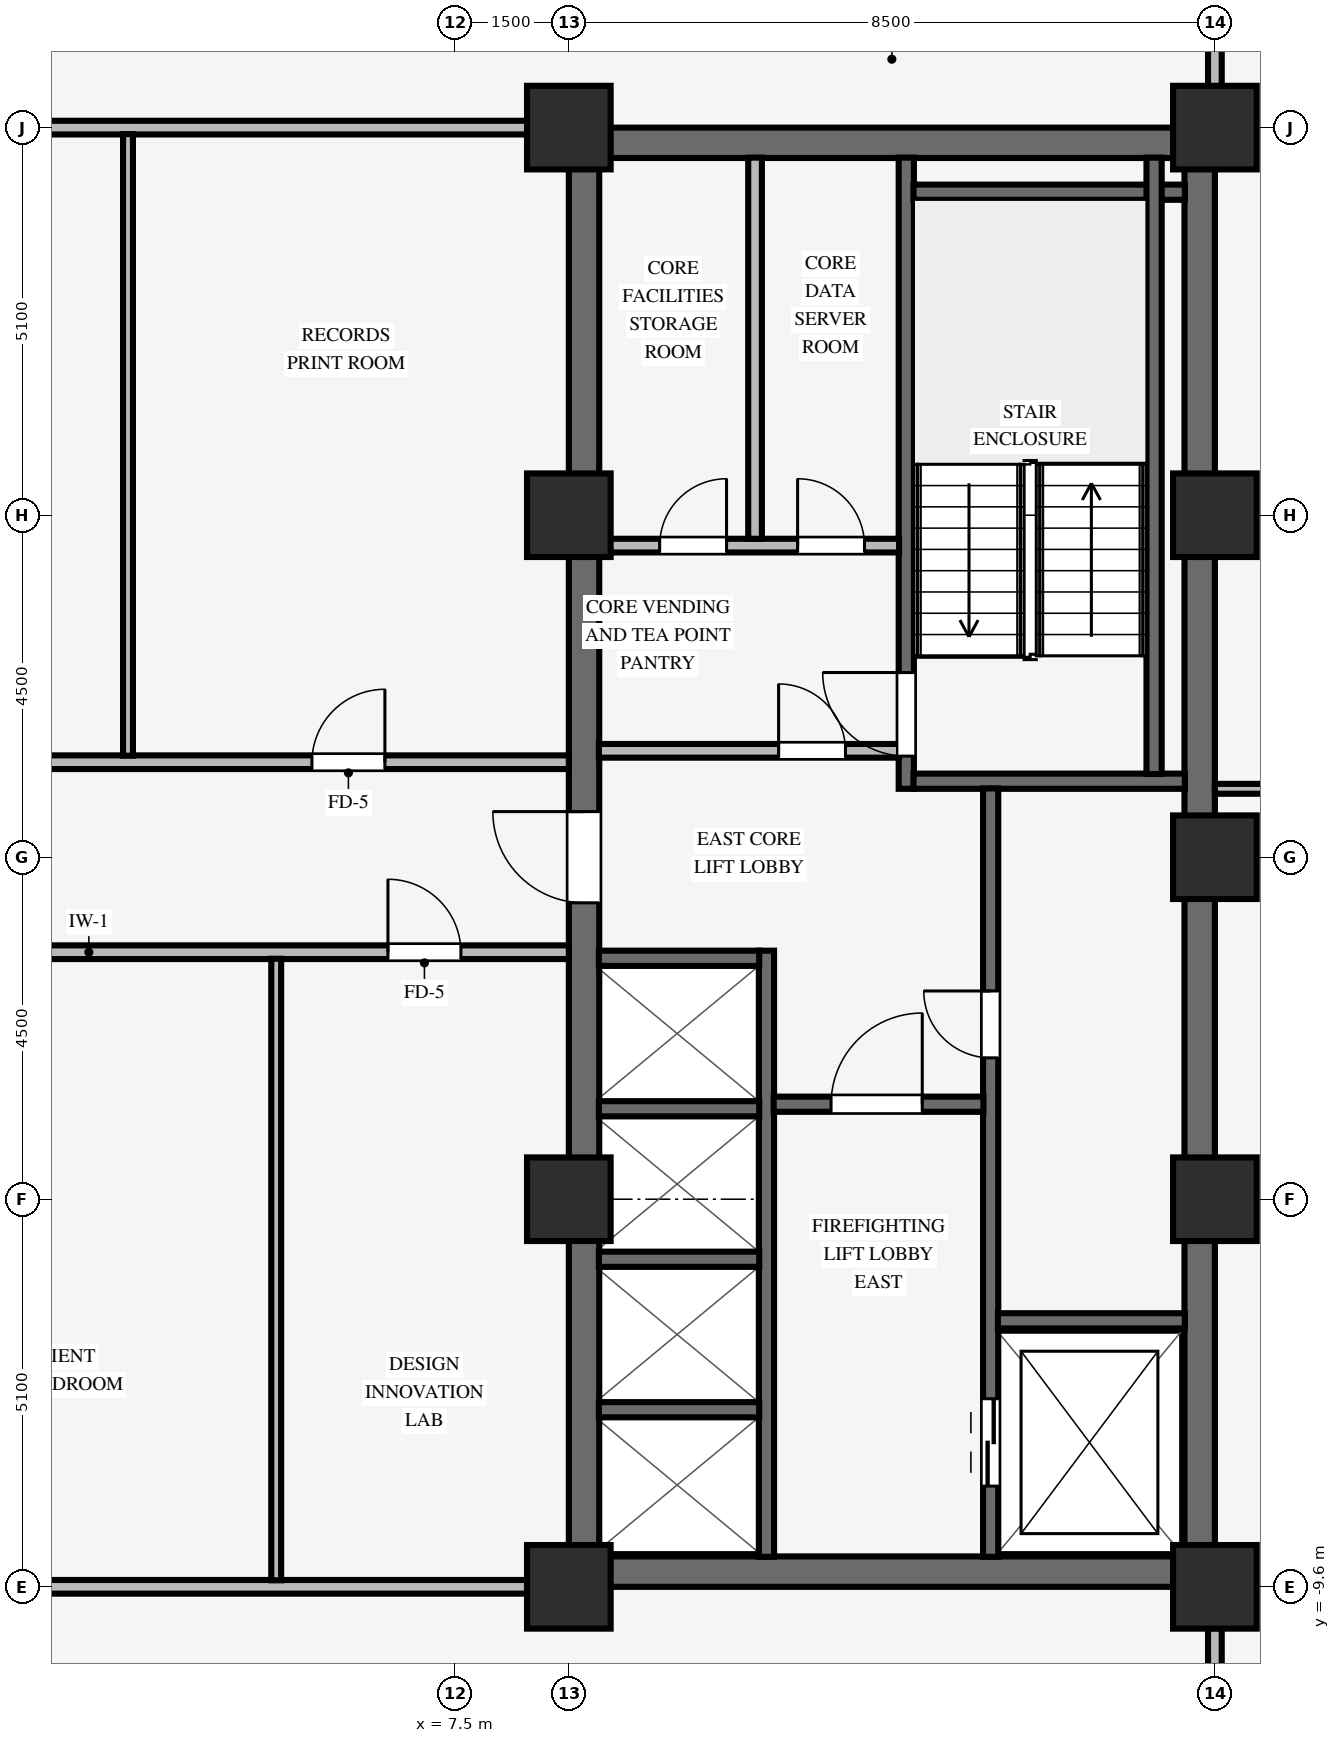
"""IFC4 building model, lengths in metres.
Left out: names, types, materials, properties, quantities, classifications, styles, units other than length and angle.
Written with IfcOpenShell. Run it as: python <this file> out.ifc"""

import sys

from ifc_helpers import new_model, si_unit, direction, frame, frame_2d, origin, origin_2d, place, context, subcontext, project, spatial, rectangle, extrude, source, transform, mapped, element, fill, save


model = new_model("IFC4")
c1 = context("Model", 3, precision=1e-05, world=origin(), true_north=direction((0.0, 1.0)))
c2 = subcontext(c1, "Body", "Model", "MODEL_VIEW")
j1 = project(units=[si_unit("LENGTHUNIT", "METRE"), si_unit("PLANEANGLEUNIT", "RADIAN")], contexts=[c1])
p1 = place(None, origin())
s1 = spatial("IfcSite", under=j1, at=p1, CompositionType="ELEMENT")
p2 = place(p1, origin())
s2 = spatial("IfcBuilding", under=s1, at=p2, CompositionType="ELEMENT")
p3 = place(p2, frame((0.0, 0.0, 109.25)))
s3 = spatial("IfcBuildingStorey", under=s2, at=p3, CompositionType="ELEMENT", Elevation=109.25)
for number, where, z_axis, x_axis in (
    (1, (9.0, -9.4, 0.0), (0.0, 0.0, 1.0), (1.0, 0.0, 0.0)),
    (2, (9.0, 9.4, 0.0), (0.0, 0.0, 1.0), (1.0, 0.0, 0.0)),
):
    element("IfcWall", number, at=place(p3, frame(where, z_axis=z_axis, x_axis=x_axis)), inside=s3, PredefinedType="SHEAR", context=c2, shape_type="SweptSolid", body=[
        extrude(rectangle(XDim=8.5, YDim=0.4, at=frame_2d((4.25, 0.0))), origin(), (0.0, 0.0, 1.0), 3.37),
    ])
p4 = place(p3, frame((9.2, -9.205, 0.0), z_axis=(0.0, 0.0, 1.0), x_axis=(0.0, 1.0, 0.0)))
e3 = element("IfcWall", 3, at=p4, inside=s3, PredefinedType="SHEAR", context=c2, shape_type="SweptSolid", body=[
    extrude(rectangle(XDim=18.41, YDim=0.4, at=frame_2d((9.205, 0.0))), origin(), (0.0, 0.0, 1.0), 3.37),
])
p5 = place(p4, frame((8.605, 0.0, 0.0)))
e4 = element("IfcOpeningElement", 4, at=p5, cuts=e3, PredefinedType="OPENING", context=c2, shape_type="SweptSolid", body=[
    extrude(rectangle(XDim=1.2, YDim=2.15, at=frame_2d((0.6, 1.075))), frame((0.0, 0.21, 0.0), z_axis=(0.0, -1.0, 0.0), x_axis=(1.0, 0.0, 0.0)), (0.0, 0.0, 1.0), 0.42),
])
p6 = place(p3, frame((17.3, -9.205, 0.0), z_axis=(0.0, 0.0, 1.0), x_axis=(0.0, 1.0, 0.0)))
e5 = element("IfcWall", 5, at=p6, inside=s3, PredefinedType="SHEAR", context=c2, shape_type="SweptSolid", body=[
    extrude(rectangle(XDim=18.41, YDim=0.4, at=frame_2d((9.205, 0.0))), origin(), (0.0, 0.0, 1.0), 3.37),
])
for number, where, z_axis, x_axis in (
    (6, (9.0, -9.6, 0.0), (0.0, 0.0, 1.0), (1.0, 0.0, 0.0)),
    (7, (9.0, -4.5, 0.0), (0.0, 0.0, 1.0), (1.0, 0.0, 0.0)),
    (8, (9.0, 4.5, 0.0), (0.0, 0.0, 1.0), (1.0, 0.0, 0.0)),
    (9, (9.0, 9.6, 0.0), (0.0, 0.0, 1.0), (1.0, 0.0, 0.0)),
    (10, (17.5, -9.6, 0.0), (0.0, 0.0, 1.0), (1.0, 0.0, 0.0)),
    (11, (17.5, -4.5, 0.0), (0.0, 0.0, 1.0), (1.0, 0.0, 0.0)),
    (12, (17.5, 4.5, 0.0), (0.0, 0.0, 1.0), (1.0, 0.0, 0.0)),
    (13, (17.5, 9.6, 0.0), (0.0, 0.0, 1.0), (1.0, 0.0, 0.0)),
    (14, (17.5, 0.0, 0.0), (0.0, 0.0, 1.0), (1.0, 0.0, 0.0)),
):
    element("IfcColumn", number, at=place(p3, frame(where, z_axis=z_axis, x_axis=x_axis)), inside=s3, PredefinedType="COLUMN", context=c2, shape_type="SweptSolid", body=[
        extrude(rectangle(XDim=1.1, YDim=1.1, at=origin_2d()), origin(), (0.0, 0.0, 1.0), 3.37),
    ])
p7 = place(p3, frame((13.44, 0.9, 0.0), z_axis=(0.0, 0.0, 1.0), x_axis=(0.0, 1.0, 0.0)))
e15 = element("IfcWall", 15, at=p7, inside=s3, PredefinedType="SHEAR", context=c2, shape_type="SweptSolid", body=[
    extrude(rectangle(XDim=8.305, YDim=0.2, at=frame_2d((4.153, 0.0))), origin(), (0.0, 0.0, 1.0), 3.37),
])
p8 = place(p7, frame((0.43, 0.0, 0.0)))
e16 = element("IfcOpeningElement", 16, at=p8, cuts=e15, PredefinedType="OPENING", context=c2, shape_type="SweptSolid", body=[
    extrude(rectangle(XDim=1.1, YDim=2.15, at=frame_2d((0.55, 1.075))), frame((0.0, 0.11, 0.0), z_axis=(0.0, -1.0, 0.0), x_axis=(1.0, 0.0, 0.0)), (0.0, 0.0, 1.0), 0.22),
])
for number, where, z_axis, x_axis in (
    (17, (13.535, 1.0, 0.0), (0.0, 0.0, 1.0), (1.0, 0.0, 0.0)),
    (18, (13.535, 8.75, 0.0), (0.0, 0.0, 1.0), (1.0, 0.0, 0.0)),
):
    element("IfcWall", number, at=place(p3, frame(where, z_axis=z_axis, x_axis=x_axis)), inside=s3, PredefinedType="SHEAR", context=c2, shape_type="SweptSolid", body=[
        extrude(rectangle(XDim=3.57, YDim=0.2, at=frame_2d((1.785, 0.0))), origin(), (0.0, 0.0, 1.0), 3.37),
    ])
p9 = place(p3, frame((16.7, 1.095, 0.0), z_axis=(0.0, 0.0, 1.0), x_axis=(0.0, 1.0, 0.0)))
e19 = element("IfcWall", 19, at=p9, inside=s3, PredefinedType="SHEAR", context=c2, shape_type="SweptSolid", body=[
    extrude(rectangle(XDim=8.11, YDim=0.2, at=frame_2d((4.055, 0.0))), origin(), (0.0, 0.0, 1.0), 3.37),
])
p10 = place(p3, frame((14.55, -9.205, 0.0), z_axis=(0.0, 0.0, 1.0), x_axis=(0.0, 1.0, 0.0)))
e20 = element("IfcWall", 20, at=p10, inside=s3, PredefinedType="SHEAR", context=c2, shape_type="SweptSolid", body=[
    extrude(rectangle(XDim=10.11, YDim=0.2, at=frame_2d((5.055, 0.0))), origin(), (0.0, 0.0, 1.0), 3.37),
])
p11 = place(p10, frame((6.565, 0.0, 0.0)))
e21 = element("IfcOpeningElement", 21, at=p11, cuts=e20, PredefinedType="OPENING", context=c2, shape_type="SweptSolid", body=[
    extrude(rectangle(XDim=0.88, YDim=2.1, at=frame_2d((0.44, 1.05))), frame((0.0, 0.11, 0.0), z_axis=(0.0, -1.0, 0.0), x_axis=(1.0, 0.0, 0.0)), (0.0, 0.0, 1.0), 0.22),
])
p12 = place(p10, frame((0.93, 0.0, 0.0)))
e22 = element("IfcOpeningElement", 22, at=p12, cuts=e20, PredefinedType="OPENING", context=c2, shape_type="SweptSolid", body=[
    extrude(rectangle(XDim=1.15, YDim=2.15, at=frame_2d((0.575, 1.075))), frame((0.0, 0.11, 0.0), z_axis=(0.0, -1.0, 0.0), x_axis=(1.0, 0.0, 0.0)), (0.0, 0.0, 1.0), 0.22),
])
p13 = place(p3, frame((14.645, -6.1, 0.0), z_axis=(0.0, 0.0, 1.0), x_axis=(1.0, 0.0, 0.0)))
e23 = element("IfcWall", 23, at=p13, inside=s3, PredefinedType="SHEAR", context=c2, shape_type="SweptSolid", body=[
    extrude(rectangle(XDim=2.46, YDim=0.2, at=frame_2d((1.23, 0.0))), origin(), (0.0, 0.0, 1.0), 3.37),
])
p14 = place(p3, frame((11.6, -9.205, 0.0), z_axis=(0.0, 0.0, 1.0), x_axis=(0.0, 1.0, 0.0)))
e24 = element("IfcWall", 24, at=p14, inside=s3, PredefinedType="SHEAR", context=c2, shape_type="SweptSolid", body=[
    extrude(rectangle(XDim=7.975, YDim=0.2, at=frame_2d((3.988, 0.0))), origin(), (0.0, 0.0, 1.0), 3.37),
])
p15 = place(p3, frame((11.695, -3.25, 0.0), z_axis=(0.0, 0.0, 1.0), x_axis=(1.0, 0.0, 0.0)))
e25 = element("IfcWall", 25, at=p15, inside=s3, PredefinedType="SHEAR", context=c2, shape_type="SweptSolid", body=[
    extrude(rectangle(XDim=2.76, YDim=0.2, at=frame_2d((1.38, 0.0))), origin(), (0.0, 0.0, 1.0), 3.37),
])
p16 = place(p15, frame((0.755, 0.0, 0.0)))
e26 = element("IfcOpeningElement", 26, at=p16, cuts=e25, PredefinedType="OPENING", context=c2, shape_type="SweptSolid", body=[
    extrude(rectangle(XDim=1.2, YDim=2.15, at=frame_2d((0.6, 1.075))), frame((0.0, 0.11, 0.0), z_axis=(0.0, -1.0, 0.0), x_axis=(1.0, 0.0, 0.0)), (0.0, 0.0, 1.0), 0.22),
])
for number, where, z_axis, x_axis in (
    (27, (9.395, -7.27, 0.0), (0.0, 0.0, 1.0), (1.0, 0.0, 0.0)),
    (28, (9.395, -5.29, 0.0), (0.0, 0.0, 1.0), (1.0, 0.0, 0.0)),
    (29, (9.395, -3.31, 0.0), (0.0, 0.0, 1.0), (1.0, 0.0, 0.0)),
    (30, (9.395, -1.33, 0.0), (0.0, 0.0, 1.0), (1.0, 0.0, 0.0)),
):
    element("IfcWall", number, at=place(p3, frame(where, z_axis=z_axis, x_axis=x_axis)), inside=s3, PredefinedType="SHEAR", context=c2, shape_type="SweptSolid", body=[
        extrude(rectangle(XDim=2.11, YDim=0.2, at=frame_2d((1.055, 0.0))), origin(), (0.0, 0.0, 1.0), 3.37),
    ])
p17 = place(p3, frame((9.395, 1.4, 0.0), z_axis=(0.0, 0.0, 1.0), x_axis=(1.0, 0.0, 0.0)))
e31 = element("IfcWall", 31, at=p17, inside=s3, PredefinedType="PARTITIONING", context=c2, shape_type="SweptSolid", body=[
    extrude(rectangle(XDim=3.95, YDim=0.18, at=frame_2d((1.975, 0.0))), origin(), (0.0, 0.0, 1.0), 3.36),
])
p18 = place(p17, frame((2.365, 0.0, 0.0)))
e32 = element("IfcOpeningElement", 32, at=p18, cuts=e31, PredefinedType="OPENING", context=c2, shape_type="SweptSolid", body=[
    extrude(rectangle(XDim=0.88, YDim=2.1, at=frame_2d((0.44, 1.05))), frame((0.0, 0.1, 0.0), z_axis=(0.0, -1.0, 0.0), x_axis=(1.0, 0.0, 0.0)), (0.0, 0.0, 1.0), 0.2),
])
p19 = place(p3, frame((9.395, 4.1, 0.0), z_axis=(0.0, 0.0, 1.0), x_axis=(1.0, 0.0, 0.0)))
e33 = element("IfcWall", 33, at=p19, inside=s3, PredefinedType="PARTITIONING", context=c2, shape_type="SweptSolid", body=[
    extrude(rectangle(XDim=3.95, YDim=0.18, at=frame_2d((1.975, 0.0))), origin(), (0.0, 0.0, 1.0), 3.36),
])
p20 = place(p19, frame((0.8, 0.0, 0.0)))
e34 = element("IfcOpeningElement", 34, at=p20, cuts=e33, PredefinedType="OPENING", context=c2, shape_type="SweptSolid", body=[
    extrude(rectangle(XDim=0.88, YDim=2.1, at=frame_2d((0.44, 1.05))), frame((0.0, 0.1, 0.0), z_axis=(0.0, -1.0, 0.0), x_axis=(1.0, 0.0, 0.0)), (0.0, 0.0, 1.0), 0.2),
])
p21 = place(p19, frame((2.615, 0.0, 0.0)))
e35 = element("IfcOpeningElement", 35, at=p21, cuts=e33, PredefinedType="OPENING", context=c2, shape_type="SweptSolid", body=[
    extrude(rectangle(XDim=0.88, YDim=2.1, at=frame_2d((0.44, 1.05))), frame((0.0, 0.1, 0.0), z_axis=(0.0, -1.0, 0.0), x_axis=(1.0, 0.0, 0.0)), (0.0, 0.0, 1.0), 0.2),
])
p22 = place(p3, frame((11.45, 4.19, 0.0), z_axis=(0.0, 0.0, 1.0), x_axis=(0.0, 1.0, 0.0)))
e36 = element("IfcWall", 36, at=p22, inside=s3, PredefinedType="PARTITIONING", context=c2, shape_type="SweptSolid", body=[
    extrude(rectangle(XDim=5.015, YDim=0.18, at=frame_2d((2.508, 0.0))), origin(), (0.0, 0.0, 1.0), 3.36),
])
p23 = place(p3, frame((0.176, -9.6, 0.0), z_axis=(0.0, 0.0, 1.0), x_axis=(1.0, 0.0, 0.0)))
e37 = element("IfcWall", 37, at=p23, inside=s3, PredefinedType="PARTITIONING", context=c2, shape_type="SweptSolid", body=[
    extrude(rectangle(XDim=8.278, YDim=0.18, at=frame_2d((4.139, 0.0))), origin(), (0.0, 0.0, 1.0), 2.405),
])
p24 = place(p3, frame((-0.8, -1.25, 0.0), z_axis=(0.0, 0.0, 1.0), x_axis=(1.0, 0.0, 0.0)))
e38 = element("IfcWall", 38, at=p24, inside=s3, PredefinedType="PARTITIONING", context=c2, shape_type="SweptSolid", body=[
    extrude(rectangle(XDim=9.8, YDim=0.18, at=frame_2d((4.9, 0.0))), origin(), (0.0, 0.0, 1.0), 3.36),
])
p25 = place(p24, frame((7.42, 0.0, 0.0)))
e39 = element("IfcOpeningElement", 39, at=p25, cuts=e38, PredefinedType="OPENING", context=c2, shape_type="SweptSolid", body=[
    extrude(rectangle(XDim=0.96, YDim=2.1, at=frame_2d((0.48, 1.05))), frame((0.0, 0.1, 0.0), z_axis=(0.0, -1.0, 0.0), x_axis=(1.0, 0.0, 0.0)), (0.0, 0.0, 1.0), 0.2),
])
p26 = place(p3, frame((17.5, 0.9, 0.0), z_axis=(0.0, 0.0, 1.0), x_axis=(1.0, 0.0, 0.0)))
e40 = element("IfcWall", 40, at=p26, inside=s3, PredefinedType="PARTITIONING", context=c2, shape_type="SweptSolid", body=[
    extrude(rectangle(XDim=6.18, YDim=0.13, at=frame_2d((3.09, 0.0))), origin(), (0.0, 0.0, 1.0), 3.36),
])
p27 = place(p3, frame((-0.8, 1.25, 0.0), z_axis=(0.0, 0.0, 1.0), x_axis=(1.0, 0.0, 0.0)))
e41 = element("IfcWall", 41, at=p27, inside=s3, PredefinedType="PARTITIONING", context=c2, shape_type="SweptSolid", body=[
    extrude(rectangle(XDim=9.8, YDim=0.18, at=frame_2d((4.9, 0.0))), origin(), (0.0, 0.0, 1.0), 3.36),
])
p28 = place(p27, frame((6.42, 0.0, 0.0)))
e42 = element("IfcOpeningElement", 42, at=p28, cuts=e41, PredefinedType="OPENING", context=c2, shape_type="SweptSolid", body=[
    extrude(rectangle(XDim=0.96, YDim=2.1, at=frame_2d((0.48, 1.05))), frame((0.0, 0.1, 0.0), z_axis=(0.0, -1.0, 0.0), x_axis=(1.0, 0.0, 0.0)), (0.0, 0.0, 1.0), 0.2),
])
p29 = place(p3, frame((0.176, 9.6, 0.0), z_axis=(0.0, 0.0, 1.0), x_axis=(1.0, 0.0, 0.0)))
e43 = element("IfcWall", 43, at=p29, inside=s3, PredefinedType="PARTITIONING", context=c2, shape_type="SweptSolid", body=[
    extrude(rectangle(XDim=8.278, YDim=0.18, at=frame_2d((4.139, 0.0))), origin(), (0.0, 0.0, 1.0), 2.405),
])
for number, where, z_axis, x_axis in (
    (44, (3.2, 1.336, 0.0), (0.0, 0.0, 1.0), (0.0, 1.0, 0.0)),
    (45, (5.15, -9.514, 0.0), (0.0, 0.0, 1.0), (0.0, 1.0, 0.0)),
):
    element("IfcWall", number, at=place(p3, frame(where, z_axis=z_axis, x_axis=x_axis)), inside=s3, PredefinedType="PARTITIONING", context=c2, shape_type="SweptSolid", body=[
        extrude(rectangle(XDim=8.178, YDim=0.13, at=frame_2d((4.089, 0.0))), origin(), (0.0, 0.0, 1.0), 3.36),
    ])
for number, where, z_axis, x_axis in (
    (46, (17.5, -11.114, 0.0), (0.0, 0.0, 1.0), (0.0, 1.0, 0.0)),
    (47, (17.5, 10.146, 0.0), (0.0, 0.0, 1.0), (0.0, 1.0, 0.0)),
):
    element("IfcWall", number, at=place(p3, frame(where, z_axis=z_axis, x_axis=x_axis)), inside=s3, PredefinedType="PARTITIONING", context=c2, shape_type="SweptSolid", body=[
        extrude(rectangle(XDim=0.968, YDim=0.18, at=frame_2d((0.484, 0.0))), origin(), (0.0, 0.0, 1.0), 2.738),
    ])
m1 = source(origin(), c2, "Body", "SweptSolid", [
    extrude(rectangle(XDim=1.1, YDim=2.15, at=frame_2d((0.55, 1.075))), frame((0.0, 0.025, 0.0), z_axis=(0.0, -1.0, 0.0), x_axis=(1.0, 0.0, 0.0)), (0.0, 0.0, 1.0), 0.05),
])
p30 = place(p8, origin())
e48 = element("IfcDoor", 48, at=p30, inside=s3, OperationType="SINGLE_SWING_RIGHT", PredefinedType="DOOR", context=c2, shape_type="MappedRepresentation", body=[
    mapped(m1, transform((0.0, 0.0, 0.0), scale=1.0)),
])
fill(e16, e48)
m2 = source(origin(), c2, "Body", "SweptSolid", [
    extrude(rectangle(XDim=0.88, YDim=2.1, at=frame_2d((0.44, 1.05))), frame((0.0, 0.025, 0.0), z_axis=(0.0, -1.0, 0.0), x_axis=(1.0, 0.0, 0.0)), (0.0, 0.0, 1.0), 0.05),
])
p31 = place(p11, origin())
e49 = element("IfcDoor", 49, at=p31, inside=s3, OperationType="SINGLE_SWING_RIGHT", PredefinedType="DOOR", context=c2, shape_type="MappedRepresentation", body=[
    mapped(m2, transform((0.0, 0.0, 0.0), scale=1.0)),
])
fill(e21, e49)
m3 = source(origin(), c2, "Body", "SweptSolid", [
    extrude(rectangle(XDim=1.2, YDim=2.15, at=frame_2d((0.6, 1.075))), frame((0.0, 0.025, 0.0), z_axis=(0.0, -1.0, 0.0), x_axis=(1.0, 0.0, 0.0)), (0.0, 0.0, 1.0), 0.05),
])
p32 = place(p16, origin())
e50 = element("IfcDoor", 50, at=p32, inside=s3, OperationType="SINGLE_SWING_RIGHT", PredefinedType="DOOR", context=c2, shape_type="MappedRepresentation", body=[
    mapped(m3, transform((0.0, 0.0, 0.0), scale=1.0)),
])
fill(e26, e50)
p33 = place(p5, origin())
e51 = element("IfcDoor", 51, at=p33, inside=s3, OperationType="SINGLE_SWING_RIGHT", PredefinedType="DOOR", context=c2, shape_type="MappedRepresentation", body=[
    mapped(m3, transform((0.0, 0.0, 0.0), scale=1.0)),
])
fill(e4, e51)
p34 = place(p18, origin())
e52 = element("IfcDoor", 52, at=p34, inside=s3, OperationType="SINGLE_SWING_LEFT", PredefinedType="DOOR", context=c2, shape_type="MappedRepresentation", body=[
    mapped(m2, transform((0.0, 0.0, 0.0), scale=1.0)),
])
fill(e32, e52)
p35 = place(p20, origin())
e53 = element("IfcDoor", 53, at=p35, inside=s3, OperationType="SINGLE_SWING_RIGHT", PredefinedType="DOOR", context=c2, shape_type="MappedRepresentation", body=[
    mapped(m2, transform((0.0, 0.0, 0.0), scale=1.0)),
])
fill(e34, e53)
p36 = place(p21, origin())
e54 = element("IfcDoor", 54, at=p36, inside=s3, OperationType="SINGLE_SWING_LEFT", PredefinedType="DOOR", context=c2, shape_type="MappedRepresentation", body=[
    mapped(m2, transform((0.0, 0.0, 0.0), scale=1.0)),
])
fill(e35, e54)
m4 = source(origin(), c2, "Body", "SweptSolid", [
    extrude(rectangle(XDim=1.15, YDim=2.15, at=frame_2d((0.575, 1.075))), frame((0.0, 0.025, 0.0), z_axis=(0.0, -1.0, 0.0), x_axis=(1.0, 0.0, 0.0)), (0.0, 0.0, 1.0), 0.05),
])
p37 = place(p12, origin())
e55 = element("IfcDoor", 55, at=p37, inside=s3, OperationType="DOUBLE_DOOR_SLIDING", PredefinedType="DOOR", context=c2, shape_type="MappedRepresentation", body=[
    mapped(m4, transform((0.0, 0.0, 0.0), scale=1.0)),
])
fill(e22, e55)
m5 = source(origin(), c2, "Body", "SweptSolid", [
    extrude(rectangle(XDim=0.96, YDim=2.1, at=frame_2d((0.48, 1.05))), frame((0.0, 0.025, 0.0), z_axis=(0.0, -1.0, 0.0), x_axis=(1.0, 0.0, 0.0)), (0.0, 0.0, 1.0), 0.05),
])
p38 = place(p28, origin())
e56 = element("IfcDoor", 56, at=p38, inside=s3, OperationType="SINGLE_SWING_RIGHT", PredefinedType="DOOR", context=c2, shape_type="MappedRepresentation", body=[
    mapped(m5, transform((0.0, 0.0, 0.0), scale=1.0)),
])
fill(e42, e56)
p39 = place(p25, origin())
e57 = element("IfcDoor", 57, at=p39, inside=s3, OperationType="SINGLE_SWING_LEFT", PredefinedType="DOOR", context=c2, shape_type="MappedRepresentation", body=[
    mapped(m5, transform((0.0, 0.0, 0.0), scale=1.0)),
])
fill(e39, e57)
save(model, sys.argv[1])
